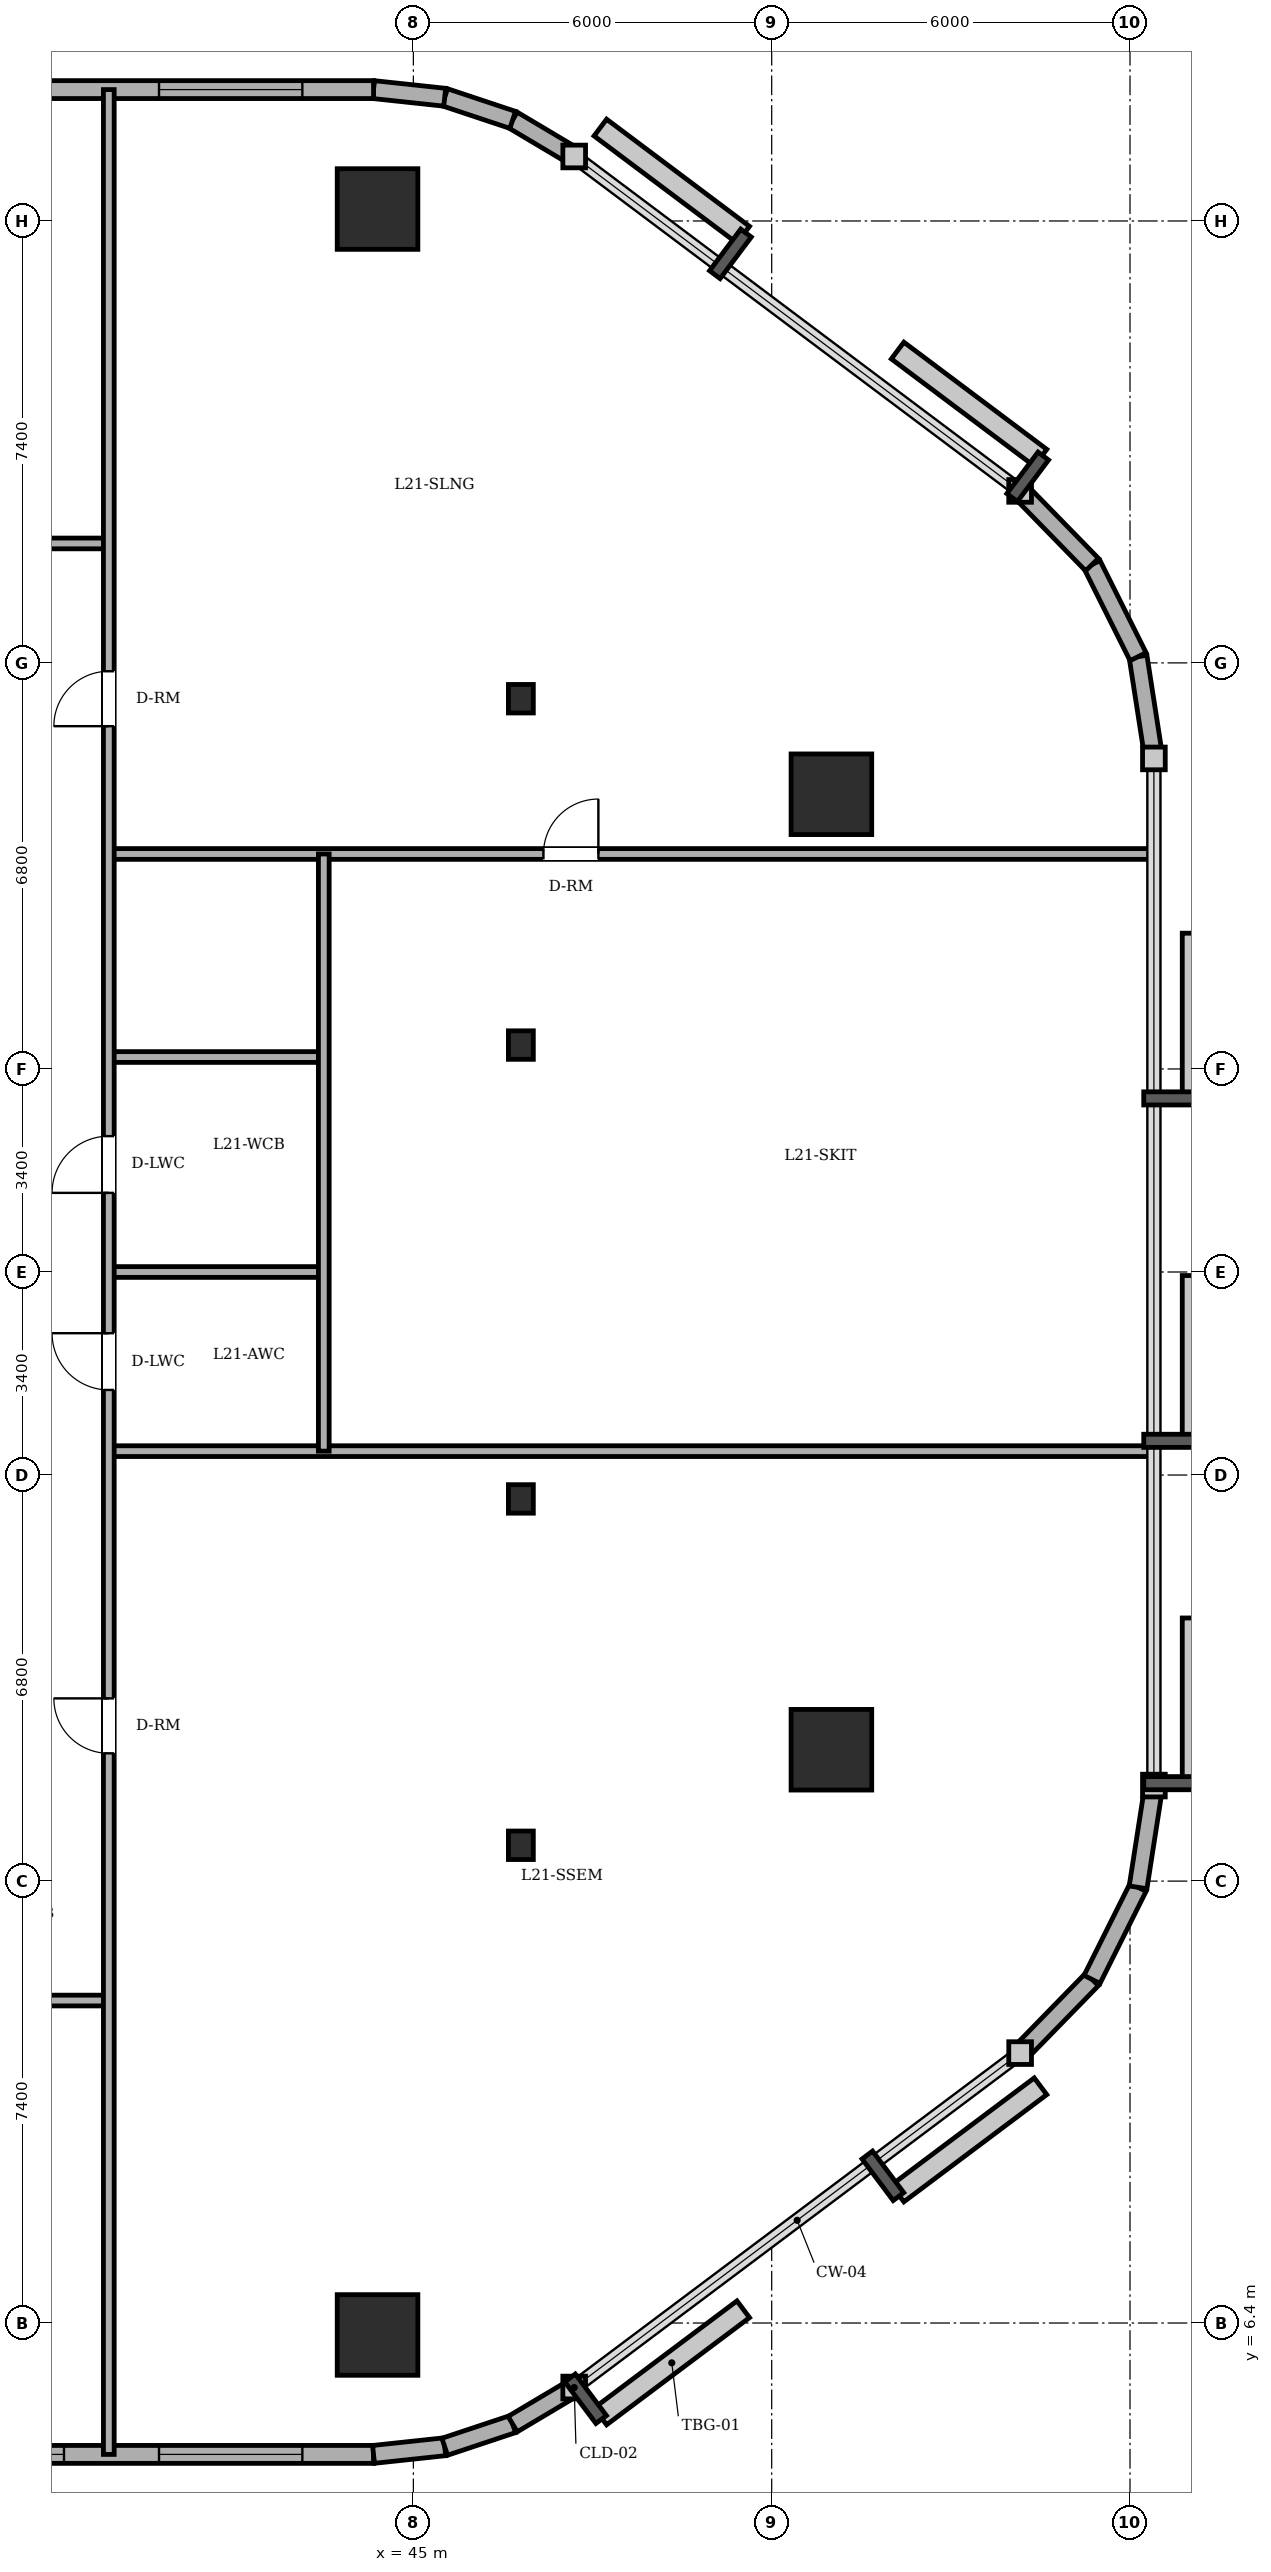
"""IFC4 building model, lengths in metres.
Left out: names, types, materials, properties, quantities, classifications, styles, units other than length and angle.
Written with IfcOpenShell. Run it as: python <this file> out.ifc"""

import sys

from ifc_helpers import new_model, si_unit, direction, frame, frame_2d, origin, origin_2d, place, context, subcontext, project, spatial, rectangle, circle, i_section, extrude, element, fill, save


model = new_model("IFC4")
c1 = context("Model", 3, precision=1e-05, world=origin(), true_north=direction((0.0, 1.0)))
c2 = subcontext(c1, "Body", "Model", "MODEL_VIEW")
j1 = project(units=[si_unit("LENGTHUNIT", "METRE"), si_unit("PLANEANGLEUNIT", "RADIAN")], contexts=[c1])
p1 = place(None, origin())
s1 = spatial("IfcSite", under=j1, at=p1, CompositionType="ELEMENT")
p2 = place(p1, origin())
s2 = spatial("IfcBuilding", under=s1, at=p2, CompositionType="ELEMENT")
p3 = place(p2, frame((0.0, 0.0, 81.2)))
s3 = spatial("IfcBuildingStorey", under=s2, at=p3, CompositionType="ELEMENT", Elevation=81.2)
for number, where, z_axis, x_axis in (
    (1, (44.4, 6.2, 0.0), (0.0, 0.0, 1.0), (1.0, 0.0, 0.0)),
    (2, (52.0, 16.0, 0.0), (0.0, 0.0, 1.0), (1.0, 0.0, 0.0)),
    (3, (52.0, 32.0, 0.0), (0.0, 0.0, 1.0), (1.0, 0.0, 0.0)),
    (4, (44.4, 41.8, 0.0), (0.0, 0.0, 1.0), (1.0, 0.0, 0.0)),
):
    element("IfcColumn", number, at=place(p3, frame(where, z_axis=z_axis, x_axis=x_axis)), inside=s3, PredefinedType="COLUMN", context=c2, shape_type="SweptSolid", body=[
        extrude(circle(Radius=0.675, at=origin_2d()), origin(), (0.0, 0.0, 1.0), 5.1),
    ])
for number, where, z_axis, x_axis in (
    (5, (46.8, 14.4, 0.0), (0.0, 0.0, 1.0), (1.0, 0.0, 0.0)),
    (6, (46.8, 20.2, 0.0), (0.0, 0.0, 1.0), (1.0, 0.0, 0.0)),
    (7, (46.8, 27.8, 0.0), (0.0, 0.0, 1.0), (1.0, 0.0, 0.0)),
    (8, (46.8, 33.6, 0.0), (0.0, 0.0, 1.0), (1.0, 0.0, 0.0)),
):
    element("IfcColumn", number, at=place(p3, frame(where, z_axis=z_axis, x_axis=x_axis)), inside=s3, PredefinedType="COLUMN", context=c2, shape_type="SweptSolid", body=[
        extrude(i_section(OverallWidth=0.417, OverallDepth=0.477, WebThickness=0.036, FlangeThickness=0.057, FilletRadius=0.015, at=origin_2d()), origin(), (0.0, 0.0, 1.0), 5.1),
    ])
p4 = place(p3, frame((14.4, 4.2, 0.0), z_axis=(0.0, 0.0, 1.0), x_axis=(1.0, 0.0, 0.0)))
e9 = element("IfcWall", 9, at=p4, inside=s3, PredefinedType="SOLIDWALL", context=c2, shape_type="SweptSolid", body=[
    extrude(rectangle(XDim=29.933, YDim=0.3, at=frame_2d((14.967, 0.0))), origin(), (0.0, 0.0, 1.0), 4.9),
])
p5 = place(p4, frame((10.925, 0.0, 0.0)))
e10 = element("IfcOpeningElement", 10, at=p5, cuts=e9, PredefinedType="OPENING", context=c2, shape_type="SweptSolid", body=[
    extrude(rectangle(XDim=0.95, YDim=2.2, at=frame_2d((0.475, 1.1))), frame((0.0, 0.16, 0.0), z_axis=(0.0, -1.0, 0.0), x_axis=(1.0, 0.0, 0.0)), (0.0, 0.0, 1.0), 0.32),
])
p6 = place(p4, frame((1.9, 0.0, 0.85)))
e11 = element("IfcOpeningElement", 11, at=p6, cuts=e9, PredefinedType="OPENING", context=c2, shape_type="SweptSolid", body=[
    extrude(rectangle(XDim=2.4, YDim=2.1, at=frame_2d((1.2, 1.05))), frame((0.0, 0.16, 0.0), z_axis=(0.0, -1.0, 0.0), x_axis=(1.0, 0.0, 0.0)), (0.0, 0.0, 1.0), 0.32),
])
p7 = place(p4, frame((4.65, 0.0, 0.85)))
e12 = element("IfcOpeningElement", 12, at=p7, cuts=e9, PredefinedType="OPENING", context=c2, shape_type="SweptSolid", body=[
    extrude(rectangle(XDim=2.4, YDim=2.1, at=frame_2d((1.2, 1.05))), frame((0.0, 0.16, 0.0), z_axis=(0.0, -1.0, 0.0), x_axis=(1.0, 0.0, 0.0)), (0.0, 0.0, 1.0), 0.32),
])
p8 = place(p4, frame((16.067, 0.0, 0.85)))
e13 = element("IfcOpeningElement", 13, at=p8, cuts=e9, PredefinedType="OPENING", context=c2, shape_type="SweptSolid", body=[
    extrude(rectangle(XDim=2.4, YDim=2.1, at=frame_2d((1.2, 1.05))), frame((0.0, 0.16, 0.0), z_axis=(0.0, -1.0, 0.0), x_axis=(1.0, 0.0, 0.0)), (0.0, 0.0, 1.0), 0.32),
])
p9 = place(p4, frame((22.35, 0.0, 0.85)))
e14 = element("IfcOpeningElement", 14, at=p9, cuts=e9, PredefinedType="OPENING", context=c2, shape_type="SweptSolid", body=[
    extrude(rectangle(XDim=2.4, YDim=2.1, at=frame_2d((1.2, 1.05))), frame((0.0, 0.16, 0.0), z_axis=(0.0, -1.0, 0.0), x_axis=(1.0, 0.0, 0.0)), (0.0, 0.0, 1.0), 0.32),
])
p10 = place(p4, frame((26.341, 0.0, 0.85)))
e15 = element("IfcOpeningElement", 15, at=p10, cuts=e9, PredefinedType="OPENING", context=c2, shape_type="SweptSolid", body=[
    extrude(rectangle(XDim=2.4, YDim=2.1, at=frame_2d((1.2, 1.05))), frame((0.0, 0.16, 0.0), z_axis=(0.0, -1.0, 0.0), x_axis=(1.0, 0.0, 0.0)), (0.0, 0.0, 1.0), 0.32),
])
p11 = place(p3, frame((44.333, 4.2, 0.0), z_axis=(0.0, 0.0, 1.0), x_axis=(0.994289103787, 0.106720092254, 0.0)))
e16 = element("IfcWall", 16, at=p11, inside=s3, PredefinedType="SOLIDWALL", context=c2, shape_type="SweptSolid", body=[
    extrude(rectangle(XDim=1.199, YDim=0.3, at=frame_2d((0.599, 0.0))), origin(), (0.0, 0.0, 1.0), 4.9),
])
p12 = place(p3, frame((45.525, 4.328, 0.0), z_axis=(0.0, 0.0, 1.0), x_axis=(0.948744332129, 0.316044604847, 0.0)))
e17 = element("IfcWall", 17, at=p12, inside=s3, PredefinedType="SOLIDWALL", context=c2, shape_type="SweptSolid", body=[
    extrude(rectangle(XDim=1.2, YDim=0.3, at=frame_2d((0.6, 0.0))), origin(), (0.0, 0.0, 1.0), 4.9),
])
p13 = place(p3, frame((46.663, 4.707, 0.0), z_axis=(0.0, 0.0, 1.0), x_axis=(0.859320591642, 0.511437308749, 0.0)))
e18 = element("IfcWall", 18, at=p13, inside=s3, PredefinedType="SOLIDWALL", context=c2, shape_type="SweptSolid", body=[
    extrude(rectangle(XDim=1.199, YDim=0.3, at=frame_2d((0.599, 0.0))), origin(), (0.0, 0.0, 1.0), 4.9),
])
for number, where, z_axis, x_axis in (
    (19, (55.16, 10.92, 0.0), (0.0, 0.0, 1.0), (0.698, 0.716, 0.0)),
    (20, (56.364, 12.154, 0.0), (0.0, 0.0, 1.0), (0.447, 0.894, 0.0)),
):
    element("IfcWall", number, at=place(p3, frame(where, z_axis=z_axis, x_axis=x_axis)), inside=s3, PredefinedType="SOLIDWALL", context=c2, shape_type="SweptSolid", body=[
        extrude(rectangle(XDim=1.724, YDim=0.3, at=frame_2d((0.862, 0.0))), origin(), (0.0, 0.0, 1.0), 4.9),
    ])
for number, where, z_axis, x_axis in (
    (21, (57.135, 13.696, 0.0), (0.0, 0.0, 1.0), (0.154, 0.988, 0.0)),
    (22, (57.4, 32.6, 0.0), (0.0, 0.0, 1.0), (-0.154, 0.988, 0.0)),
):
    element("IfcWall", number, at=place(p3, frame(where, z_axis=z_axis, x_axis=x_axis)), inside=s3, PredefinedType="SOLIDWALL", context=c2, shape_type="SweptSolid", body=[
        extrude(rectangle(XDim=1.724, YDim=0.3, at=frame_2d((0.862, 0.0))), origin(), (0.0, 0.0, 1.0), 4.9),
    ])
for number, where, z_axis, x_axis in (
    (23, (57.135, 34.304, 0.0), (0.0, 0.0, 1.0), (-0.447, 0.894, 0.0)),
    (24, (56.364, 35.846, 0.0), (0.0, 0.0, 1.0), (-0.698, 0.716, 0.0)),
):
    element("IfcWall", number, at=place(p3, frame(where, z_axis=z_axis, x_axis=x_axis)), inside=s3, PredefinedType="SOLIDWALL", context=c2, shape_type="SweptSolid", body=[
        extrude(rectangle(XDim=1.724, YDim=0.3, at=frame_2d((0.862, 0.0))), origin(), (0.0, 0.0, 1.0), 4.9),
    ])
p14 = place(p3, frame((47.693, 42.68, 0.0), z_axis=(0.0, 0.0, 1.0), x_axis=(-0.859320591642, 0.511437308749, 0.0)))
e25 = element("IfcWall", 25, at=p14, inside=s3, PredefinedType="SOLIDWALL", context=c2, shape_type="SweptSolid", body=[
    extrude(rectangle(XDim=1.199, YDim=0.3, at=frame_2d((0.599, 0.0))), origin(), (0.0, 0.0, 1.0), 4.9),
])
p15 = place(p3, frame((46.663, 43.293, 0.0), z_axis=(0.0, 0.0, 1.0), x_axis=(-0.948744332129, 0.316044604847, 0.0)))
e26 = element("IfcWall", 26, at=p15, inside=s3, PredefinedType="SOLIDWALL", context=c2, shape_type="SweptSolid", body=[
    extrude(rectangle(XDim=1.2, YDim=0.3, at=frame_2d((0.6, 0.0))), origin(), (0.0, 0.0, 1.0), 4.9),
])
p16 = place(p3, frame((45.525, 43.672, 0.0), z_axis=(0.0, 0.0, 1.0), x_axis=(-0.994289103787, 0.106720092254, 0.0)))
e27 = element("IfcWall", 27, at=p16, inside=s3, PredefinedType="SOLIDWALL", context=c2, shape_type="SweptSolid", body=[
    extrude(rectangle(XDim=1.199, YDim=0.3, at=frame_2d((0.599, 0.0))), origin(), (0.0, 0.0, 1.0), 4.9),
])
p17 = place(p3, frame((44.333, 43.8, 0.0), z_axis=(0.0, 0.0, 1.0), x_axis=(-1.0, 0.0, 0.0)))
e28 = element("IfcWall", 28, at=p17, inside=s3, PredefinedType="SOLIDWALL", context=c2, shape_type="SweptSolid", body=[
    extrude(rectangle(XDim=29.933, YDim=0.3, at=frame_2d((14.967, 0.0))), origin(), (0.0, 0.0, 1.0), 4.9),
])
p18 = place(p17, frame((22.558, 0.0, 0.0)))
e29 = element("IfcOpeningElement", 29, at=p18, cuts=e28, PredefinedType="OPENING", context=c2, shape_type="SweptSolid", body=[
    extrude(rectangle(XDim=0.95, YDim=2.2, at=frame_2d((0.475, 1.1))), frame((0.0, 0.16, 0.0), z_axis=(0.0, -1.0, 0.0), x_axis=(1.0, 0.0, 0.0)), (0.0, 0.0, 1.0), 0.32),
])
p19 = place(p17, frame((1.192, 0.0, 0.85)))
e30 = element("IfcOpeningElement", 30, at=p19, cuts=e28, PredefinedType="OPENING", context=c2, shape_type="SweptSolid", body=[
    extrude(rectangle(XDim=2.4, YDim=2.1, at=frame_2d((1.2, 1.05))), frame((0.0, 0.16, 0.0), z_axis=(0.0, -1.0, 0.0), x_axis=(1.0, 0.0, 0.0)), (0.0, 0.0, 1.0), 0.32),
])
p20 = place(p17, frame((11.616, 0.0, 0.85)))
e31 = element("IfcOpeningElement", 31, at=p20, cuts=e28, PredefinedType="OPENING", context=c2, shape_type="SweptSolid", body=[
    extrude(rectangle(XDim=2.4, YDim=2.1, at=frame_2d((1.2, 1.05))), frame((0.0, 0.16, 0.0), z_axis=(0.0, -1.0, 0.0), x_axis=(1.0, 0.0, 0.0)), (0.0, 0.0, 1.0), 0.32),
])
p21 = place(p3, frame((8.8, 11.8, 0.0), z_axis=(0.0, 0.0, 1.0), x_axis=(1.0, 0.0, 0.0)))
e32 = element("IfcWall", 32, at=p21, inside=s3, PredefinedType="PARTITIONING", context=c2, shape_type="SweptSolid", body=[
    extrude(rectangle(XDim=31.1, YDim=0.18, at=frame_2d((15.55, 0.0))), origin(), (0.0, 0.0, 1.0), 4.9),
])
p22 = place(p21, frame((20.25, 0.0, 0.0)))
e33 = element("IfcOpeningElement", 33, at=p22, cuts=e32, PredefinedType="OPENING", context=c2, shape_type="SweptSolid", body=[
    extrude(rectangle(XDim=0.9, YDim=2.05, at=frame_2d((0.45, 1.025))), frame((0.0, 0.1, 0.0), z_axis=(0.0, -1.0, 0.0), x_axis=(1.0, 0.0, 0.0)), (0.0, 0.0, 1.0), 0.2),
])
p23 = place(p3, frame((39.9, 21.0, 0.0), z_axis=(0.0, 0.0, 1.0), x_axis=(1.0, 0.0, 0.0)))
e34 = element("IfcWall", 34, at=p23, inside=s3, PredefinedType="PARTITIONING", context=c2, shape_type="SweptSolid", body=[
    extrude(rectangle(XDim=17.5, YDim=0.18, at=frame_2d((8.75, 0.0))), origin(), (0.0, 0.0, 1.0), 4.9),
])
p24 = place(p3, frame((39.9, 24.0, 0.0), z_axis=(0.0, 0.0, 1.0), x_axis=(1.0, 0.0, 0.0)))
e35 = element("IfcWall", 35, at=p24, inside=s3, PredefinedType="PARTITIONING", context=c2, shape_type="SweptSolid", body=[
    extrude(rectangle(XDim=3.6, YDim=0.18, at=frame_2d((1.8, 0.0))), origin(), (0.0, 0.0, 1.0), 4.582),
])
p25 = place(p3, frame((39.9, 27.6, 0.0), z_axis=(0.0, 0.0, 1.0), x_axis=(1.0, 0.0, 0.0)))
e36 = element("IfcWall", 36, at=p25, inside=s3, PredefinedType="PARTITIONING", context=c2, shape_type="SweptSolid", body=[
    extrude(rectangle(XDim=3.6, YDim=0.18, at=frame_2d((1.8, 0.0))), origin(), (0.0, 0.0, 1.0), 4.382),
])
p26 = place(p3, frame((39.9, 31.0, 0.0), z_axis=(0.0, 0.0, 1.0), x_axis=(1.0, 0.0, 0.0)))
e37 = element("IfcWall", 37, at=p26, inside=s3, PredefinedType="PARTITIONING", context=c2, shape_type="SweptSolid", body=[
    extrude(rectangle(XDim=17.5, YDim=0.18, at=frame_2d((8.75, 0.0))), origin(), (0.0, 0.0, 1.0), 4.9),
])
p27 = place(p26, frame((7.278, 0.0, 0.0)))
e38 = element("IfcOpeningElement", 38, at=p27, cuts=e37, PredefinedType="OPENING", context=c2, shape_type="SweptSolid", body=[
    extrude(rectangle(XDim=0.92, YDim=2.1, at=frame_2d((0.46, 1.05))), frame((0.0, 0.1, 0.0), z_axis=(0.0, -1.0, 0.0), x_axis=(1.0, 0.0, 0.0)), (0.0, 0.0, 1.0), 0.2),
])
p28 = place(p3, frame((8.8, 36.2, 0.0), z_axis=(0.0, 0.0, 1.0), x_axis=(1.0, 0.0, 0.0)))
e39 = element("IfcWall", 39, at=p28, inside=s3, PredefinedType="PARTITIONING", context=c2, shape_type="SweptSolid", body=[
    extrude(rectangle(XDim=31.1, YDim=0.18, at=frame_2d((15.55, 0.0))), origin(), (0.0, 0.0, 1.0), 4.9),
])
p29 = place(p3, frame((39.9, 4.2, 0.0), z_axis=(0.0, 0.0, 1.0), x_axis=(0.0, 1.0, 0.0)))
e40 = element("IfcWall", 40, at=p29, inside=s3, PredefinedType="PARTITIONING", context=c2, shape_type="SweptSolid", body=[
    extrude(rectangle(XDim=39.6, YDim=0.18, at=frame_2d((19.8, 0.0))), origin(), (0.0, 0.0, 1.0), 4.9),
])
p30 = place(p29, frame((17.825, 0.0, 0.0)))
e41 = element("IfcOpeningElement", 41, at=p30, cuts=e40, PredefinedType="OPENING", context=c2, shape_type="SweptSolid", body=[
    extrude(rectangle(XDim=0.95, YDim=2.15, at=frame_2d((0.475, 1.075))), frame((0.0, 0.1, 0.0), z_axis=(0.0, -1.0, 0.0), x_axis=(1.0, 0.0, 0.0)), (0.0, 0.0, 1.0), 0.2),
])
p31 = place(p29, frame((21.125, 0.0, 0.0)))
e42 = element("IfcOpeningElement", 42, at=p31, cuts=e40, PredefinedType="OPENING", context=c2, shape_type="SweptSolid", body=[
    extrude(rectangle(XDim=0.95, YDim=2.15, at=frame_2d((0.475, 1.075))), frame((0.0, 0.1, 0.0), z_axis=(0.0, -1.0, 0.0), x_axis=(1.0, 0.0, 0.0)), (0.0, 0.0, 1.0), 0.2),
])
p32 = place(p29, frame((28.94, 0.0, 0.0)))
e43 = element("IfcOpeningElement", 43, at=p32, cuts=e40, PredefinedType="OPENING", context=c2, shape_type="SweptSolid", body=[
    extrude(rectangle(XDim=0.92, YDim=2.1, at=frame_2d((0.46, 1.05))), frame((0.0, 0.1, 0.0), z_axis=(0.0, -1.0, 0.0), x_axis=(1.0, 0.0, 0.0)), (0.0, 0.0, 1.0), 0.2),
])
p33 = place(p29, frame((11.74, 0.0, 0.0)))
e44 = element("IfcOpeningElement", 44, at=p33, cuts=e40, PredefinedType="OPENING", context=c2, shape_type="SweptSolid", body=[
    extrude(rectangle(XDim=0.92, YDim=2.1, at=frame_2d((0.46, 1.05))), frame((0.0, 0.1, 0.0), z_axis=(0.0, -1.0, 0.0), x_axis=(1.0, 0.0, 0.0)), (0.0, 0.0, 1.0), 0.2),
])
p34 = place(p3, frame((43.5, 21.0, 0.0), z_axis=(0.0, 0.0, 1.0), x_axis=(0.0, 1.0, 0.0)))
e45 = element("IfcWall", 45, at=p34, inside=s3, PredefinedType="PARTITIONING", context=c2, shape_type="SweptSolid", body=[
    extrude(rectangle(XDim=10.0, YDim=0.18, at=frame_2d((5.0, 0.0))), origin(), (0.0, 0.0, 1.0), 4.9),
])
p35 = place(p9, origin())
e46 = element("IfcWindow", 46, at=p35, inside=s3, PartitioningType="TRIPLE_PANEL_VERTICAL", PredefinedType="WINDOW", context=c2, shape_type="SweptSolid", body=[
    extrude(rectangle(XDim=2.4, YDim=2.1, at=frame_2d((1.2, 1.05))), frame((0.0, 0.03, 0.0), z_axis=(0.0, -1.0, 0.0), x_axis=(1.0, 0.0, 0.0)), (0.0, 0.0, 1.0), 0.06),
])
fill(e14, e46)
p36 = place(p10, origin())
e47 = element("IfcWindow", 47, at=p36, inside=s3, PartitioningType="TRIPLE_PANEL_VERTICAL", PredefinedType="WINDOW", context=c2, shape_type="SweptSolid", body=[
    extrude(rectangle(XDim=2.4, YDim=2.1, at=frame_2d((1.2, 1.05))), frame((0.0, 0.03, 0.0), z_axis=(0.0, -1.0, 0.0), x_axis=(1.0, 0.0, 0.0)), (0.0, 0.0, 1.0), 0.06),
])
fill(e15, e47)
p37 = place(p19, origin())
e48 = element("IfcWindow", 48, at=p37, inside=s3, PartitioningType="TRIPLE_PANEL_VERTICAL", PredefinedType="WINDOW", context=c2, shape_type="SweptSolid", body=[
    extrude(rectangle(XDim=2.4, YDim=2.1, at=frame_2d((1.2, 1.05))), frame((0.0, 0.03, 0.0), z_axis=(0.0, -1.0, 0.0), x_axis=(1.0, 0.0, 0.0)), (0.0, 0.0, 1.0), 0.06),
])
fill(e30, e48)
p38 = place(p30, origin())
e49 = element("IfcDoor", 49, at=p38, inside=s3, OperationType="SINGLE_SWING_RIGHT", PredefinedType="DOOR", context=c2, shape_type="SweptSolid", body=[
    extrude(rectangle(XDim=0.95, YDim=2.15, at=frame_2d((0.475, 1.075))), frame((0.0, 0.025, 0.0), z_axis=(0.0, -1.0, 0.0), x_axis=(1.0, 0.0, 0.0)), (0.0, 0.0, 1.0), 0.05),
])
fill(e41, e49)
p39 = place(p31, origin())
e50 = element("IfcDoor", 50, at=p39, inside=s3, OperationType="SINGLE_SWING_LEFT", PredefinedType="DOOR", context=c2, shape_type="SweptSolid", body=[
    extrude(rectangle(XDim=0.95, YDim=2.15, at=frame_2d((0.475, 1.075))), frame((0.0, 0.025, 0.0), z_axis=(0.0, -1.0, 0.0), x_axis=(1.0, 0.0, 0.0)), (0.0, 0.0, 1.0), 0.05),
])
fill(e42, e50)
p40 = place(p32, origin())
e51 = element("IfcDoor", 51, at=p40, inside=s3, OperationType="SINGLE_SWING_LEFT", PredefinedType="DOOR", context=c2, shape_type="SweptSolid", body=[
    extrude(rectangle(XDim=0.92, YDim=2.1, at=frame_2d((0.46, 1.05))), frame((0.0, 0.025, 0.0), z_axis=(0.0, -1.0, 0.0), x_axis=(1.0, 0.0, 0.0)), (0.0, 0.0, 1.0), 0.05),
])
fill(e43, e51)
p41 = place(p33, origin())
e52 = element("IfcDoor", 52, at=p41, inside=s3, OperationType="SINGLE_SWING_RIGHT", PredefinedType="DOOR", context=c2, shape_type="SweptSolid", body=[
    extrude(rectangle(XDim=0.92, YDim=2.1, at=frame_2d((0.46, 1.05))), frame((0.0, 0.025, 0.0), z_axis=(0.0, -1.0, 0.0), x_axis=(1.0, 0.0, 0.0)), (0.0, 0.0, 1.0), 0.05),
])
fill(e44, e52)
p42 = place(p27, origin())
e53 = element("IfcDoor", 53, at=p42, inside=s3, OperationType="SINGLE_SWING_RIGHT", PredefinedType="DOOR", context=c2, shape_type="SweptSolid", body=[
    extrude(rectangle(XDim=0.92, YDim=2.1, at=frame_2d((0.46, 1.05))), frame((0.0, 0.025, 0.0), z_axis=(0.0, -1.0, 0.0), x_axis=(1.0, 0.0, 0.0)), (0.0, 0.0, 1.0), 0.05),
])
fill(e38, e53)
save(model, sys.argv[1])
